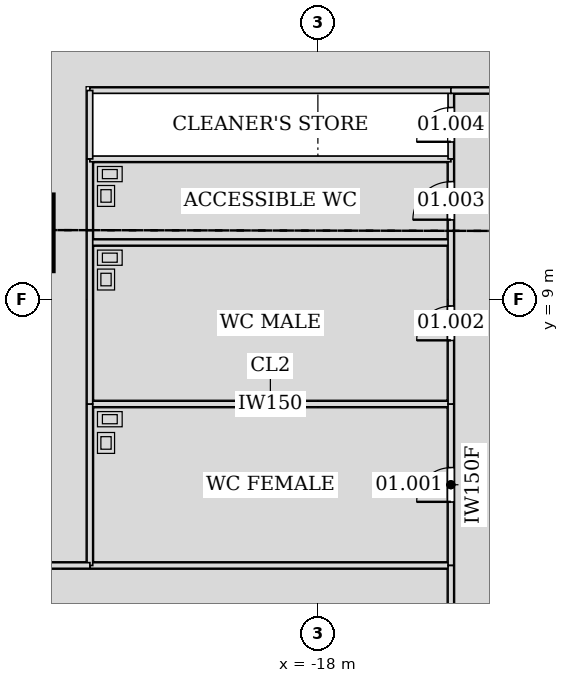
"""IFC4 building model, lengths in metres.
Left out: names, types, materials, properties, quantities, classifications, styles, units other than length and angle.
Written with IfcOpenShell. Run it as: python <this file> out.ifc"""

import sys

from ifc_helpers import new_model, si_unit, direction, frame, frame_2d, origin, origin_2d, place, context, subcontext, project, spatial, rectangle, hollow_rectangle, extrude, element, fill, save


model = new_model("IFC4")
c1 = context("Model", 3, precision=1e-05, world=origin(), true_north=direction((0.0, 1.0)))
c2 = subcontext(c1, "Body", "Model", "MODEL_VIEW")
j1 = project(units=[si_unit("LENGTHUNIT", "METRE"), si_unit("PLANEANGLEUNIT", "RADIAN")], contexts=[c1])
p1 = place(None, origin())
s1 = spatial("IfcSite", under=j1, at=p1, CompositionType="ELEMENT")
p2 = place(p1, origin())
s2 = spatial("IfcBuilding", under=s1, at=p2, CompositionType="ELEMENT")
p3 = place(p2, frame((0.0, 0.0, 7.2)))
s3 = spatial("IfcBuildingStorey", under=s2, at=p3, CompositionType="ELEMENT", Elevation=7.2)
p4 = place(p3, frame((-26.133, 10.824, 0.0), z_axis=(0.028266381762, -0.011713263234, 0.999531795956), x_axis=(0.38282136346, 0.923822387517, 0.0)))
e1 = element("IfcColumn", 1, at=p4, inside=s3, PredefinedType="COLUMN", context=c2, shape_type="SweptSolid", body=[
    extrude(hollow_rectangle(XDim=2.0, YDim=2.0, WallThickness=0.09, at=origin_2d()), origin(), (0.0, 0.0, 1.0), 6.003),
])
p5 = place(p3, frame((-14.788, 35.876, 0.0), z_axis=(0.0, 0.0, 1.0), x_axis=(-0.707106781187, -0.707106781187, 0.0)))
e2 = element("IfcWall", 2, at=p5, inside=s3, PredefinedType="SOLIDWALL", context=c2, shape_type="SweptSolid", body=[
    extrude(rectangle(XDim=29.823, YDim=0.35, at=frame_2d((14.912, 0.0))), origin(), (0.0, 0.0, 1.0), 5.7),
])
p6 = place(p5, frame((0.822, 0.0, 0.9)))
e3 = element("IfcOpeningElement", 3, at=p6, cuts=e2, PredefinedType="OPENING", context=c2, shape_type="SweptSolid", body=[
    extrude(rectangle(XDim=1.2, YDim=4.2, at=frame_2d((0.6, 2.1))), frame((0.0, 0.185, 0.0), z_axis=(0.0, -1.0, 0.0), x_axis=(1.0, 0.0, 0.0)), (0.0, 0.0, 1.0), 0.37),
])
p7 = place(p5, frame((3.52, 0.0, 0.9)))
e4 = element("IfcOpeningElement", 4, at=p7, cuts=e2, PredefinedType="OPENING", context=c2, shape_type="SweptSolid", body=[
    extrude(rectangle(XDim=1.2, YDim=4.2, at=frame_2d((0.6, 2.1))), frame((0.0, 0.185, 0.0), z_axis=(0.0, -1.0, 0.0), x_axis=(1.0, 0.0, 0.0)), (0.0, 0.0, 1.0), 0.37),
])
p8 = place(p5, frame((6.218, 0.0, 0.9)))
e5 = element("IfcOpeningElement", 5, at=p8, cuts=e2, PredefinedType="OPENING", context=c2, shape_type="SweptSolid", body=[
    extrude(rectangle(XDim=1.2, YDim=4.2, at=frame_2d((0.6, 2.1))), frame((0.0, 0.185, 0.0), z_axis=(0.0, -1.0, 0.0), x_axis=(1.0, 0.0, 0.0)), (0.0, 0.0, 1.0), 0.37),
])
p9 = place(p5, frame((8.916, 0.0, 0.9)))
e6 = element("IfcOpeningElement", 6, at=p9, cuts=e2, PredefinedType="OPENING", context=c2, shape_type="SweptSolid", body=[
    extrude(rectangle(XDim=1.2, YDim=4.2, at=frame_2d((0.6, 2.1))), frame((0.0, 0.185, 0.0), z_axis=(0.0, -1.0, 0.0), x_axis=(1.0, 0.0, 0.0)), (0.0, 0.0, 1.0), 0.37),
])
p10 = place(p5, frame((11.614, 0.0, 0.9)))
e7 = element("IfcOpeningElement", 7, at=p10, cuts=e2, PredefinedType="OPENING", context=c2, shape_type="SweptSolid", body=[
    extrude(rectangle(XDim=1.2, YDim=4.2, at=frame_2d((0.6, 2.1))), frame((0.0, 0.185, 0.0), z_axis=(0.0, -1.0, 0.0), x_axis=(1.0, 0.0, 0.0)), (0.0, 0.0, 1.0), 0.37),
])
p11 = place(p5, frame((14.312, 0.0, 0.9)))
e8 = element("IfcOpeningElement", 8, at=p11, cuts=e2, PredefinedType="OPENING", context=c2, shape_type="SweptSolid", body=[
    extrude(rectangle(XDim=1.2, YDim=4.2, at=frame_2d((0.6, 2.1))), frame((0.0, 0.185, 0.0), z_axis=(0.0, -1.0, 0.0), x_axis=(1.0, 0.0, 0.0)), (0.0, 0.0, 1.0), 0.37),
])
p12 = place(p5, frame((17.01, 0.0, 0.9)))
e9 = element("IfcOpeningElement", 9, at=p12, cuts=e2, PredefinedType="OPENING", context=c2, shape_type="SweptSolid", body=[
    extrude(rectangle(XDim=1.2, YDim=4.2, at=frame_2d((0.6, 2.1))), frame((0.0, 0.185, 0.0), z_axis=(0.0, -1.0, 0.0), x_axis=(1.0, 0.0, 0.0)), (0.0, 0.0, 1.0), 0.37),
])
p13 = place(p5, frame((19.708, 0.0, 0.9)))
e10 = element("IfcOpeningElement", 10, at=p13, cuts=e2, PredefinedType="OPENING", context=c2, shape_type="SweptSolid", body=[
    extrude(rectangle(XDim=1.2, YDim=4.2, at=frame_2d((0.6, 2.1))), frame((0.0, 0.185, 0.0), z_axis=(0.0, -1.0, 0.0), x_axis=(1.0, 0.0, 0.0)), (0.0, 0.0, 1.0), 0.37),
])
p14 = place(p5, frame((22.406, 0.0, 0.9)))
e11 = element("IfcOpeningElement", 11, at=p14, cuts=e2, PredefinedType="OPENING", context=c2, shape_type="SweptSolid", body=[
    extrude(rectangle(XDim=1.2, YDim=4.2, at=frame_2d((0.6, 2.1))), frame((0.0, 0.185, 0.0), z_axis=(0.0, -1.0, 0.0), x_axis=(1.0, 0.0, 0.0)), (0.0, 0.0, 1.0), 0.37),
])
p15 = place(p5, frame((25.104, 0.0, 0.9)))
e12 = element("IfcOpeningElement", 12, at=p15, cuts=e2, PredefinedType="OPENING", context=c2, shape_type="SweptSolid", body=[
    extrude(rectangle(XDim=1.2, YDim=4.2, at=frame_2d((0.6, 2.1))), frame((0.0, 0.185, 0.0), z_axis=(0.0, -1.0, 0.0), x_axis=(1.0, 0.0, 0.0)), (0.0, 0.0, 1.0), 0.37),
])
p16 = place(p5, frame((27.802, 0.0, 0.9)))
e13 = element("IfcOpeningElement", 13, at=p16, cuts=e2, PredefinedType="OPENING", context=c2, shape_type="SweptSolid", body=[
    extrude(rectangle(XDim=1.2, YDim=4.2, at=frame_2d((0.6, 2.1))), frame((0.0, 0.185, 0.0), z_axis=(0.0, -1.0, 0.0), x_axis=(1.0, 0.0, 0.0)), (0.0, 0.0, 1.0), 0.37),
])
for number, where, z_axis, x_axis in (
    (14, (-14.5, 6.25, 0.0), (0.0, 0.0, 1.0), (-1.0, 0.0, 0.0)),
    (15, (-24.0, 2.0, 0.0), (0.0, 0.0, 1.0), (1.0, 0.0, 0.0)),
):
    element("IfcWall", number, at=place(p3, frame(where, z_axis=z_axis, x_axis=x_axis)), inside=s3, PredefinedType="PARTITIONING", context=c2, shape_type="SweptSolid", body=[
        extrude(rectangle(XDim=9.5, YDim=0.15, at=frame_2d((4.75, 0.0))), origin(), (0.0, 0.0, 1.0), 4.844),
    ])
p17 = place(p3, frame((-14.5, 2.0, 0.0), z_axis=(0.0, 0.0, 1.0), x_axis=(0.0, 1.0, 0.0)))
e16 = element("IfcWall", 16, at=p17, inside=s3, PredefinedType="PARTITIONING", context=c2, shape_type="SweptSolid", body=[
    extrude(rectangle(XDim=4.25, YDim=0.15, at=frame_2d((2.125, 0.0))), origin(), (0.0, 0.0, 1.0), 5.7),
])
p18 = place(p17, frame((1.675, 0.0, 0.0)))
e17 = element("IfcOpeningElement", 17, at=p18, cuts=e16, PredefinedType="OPENING", context=c2, shape_type="SweptSolid", body=[
    extrude(rectangle(XDim=0.9, YDim=2.1, at=frame_2d((0.45, 1.05))), frame((0.0, 0.085, 0.0), z_axis=(0.0, -1.0, 0.0), x_axis=(1.0, 0.0, 0.0)), (0.0, 0.0, 1.0), 0.17),
])
p19 = place(p3, frame((-24.0, 6.25, 0.0), z_axis=(0.0, 0.0, 1.0), x_axis=(0.0, -1.0, 0.0)))
e18 = element("IfcWall", 18, at=p19, inside=s3, PredefinedType="PARTITIONING", context=c2, shape_type="SweptSolid", body=[
    extrude(rectangle(XDim=4.25, YDim=0.15, at=frame_2d((2.125, 0.0))), origin(), (0.0, 0.0, 1.0), 4.832),
])
p20 = place(p3, frame((-14.5, 10.5, 0.0), z_axis=(0.0, 0.0, 1.0), x_axis=(-1.0, 0.0, 0.0)))
e19 = element("IfcWall", 19, at=p20, inside=s3, PredefinedType="PARTITIONING", context=c2, shape_type="SweptSolid", body=[
    extrude(rectangle(XDim=9.5, YDim=0.15, at=frame_2d((4.75, 0.0))), origin(), (0.0, 0.0, 1.0), 4.39),
])
p21 = place(p3, frame((-14.5, 6.25, 0.0), z_axis=(0.0, 0.0, 1.0), x_axis=(0.0, 1.0, 0.0)))
e20 = element("IfcWall", 20, at=p21, inside=s3, PredefinedType="PARTITIONING", context=c2, shape_type="SweptSolid", body=[
    extrude(rectangle(XDim=6.45, YDim=0.15, at=frame_2d((3.225, 0.0))), origin(), (0.0, 0.0, 1.0), 4.39),
])
p22 = place(p21, frame((1.675, 0.0, 0.0)))
e21 = element("IfcOpeningElement", 21, at=p22, cuts=e20, PredefinedType="OPENING", context=c2, shape_type="SweptSolid", body=[
    extrude(rectangle(XDim=0.9, YDim=2.1, at=frame_2d((0.45, 1.05))), frame((0.0, 0.085, 0.0), z_axis=(0.0, -1.0, 0.0), x_axis=(1.0, 0.0, 0.0)), (0.0, 0.0, 1.0), 0.17),
])
p23 = place(p21, frame((4.85, 0.0, 0.0)))
e22 = element("IfcOpeningElement", 22, at=p23, cuts=e20, PredefinedType="OPENING", context=c2, shape_type="SweptSolid", body=[
    extrude(rectangle(XDim=1.0, YDim=2.1, at=frame_2d((0.5, 1.05))), frame((0.0, 0.085, 0.0), z_axis=(0.0, -1.0, 0.0), x_axis=(1.0, 0.0, 0.0)), (0.0, 0.0, 1.0), 0.17),
])
p24 = place(p3, frame((-24.0, 6.25, 0.0), z_axis=(0.0, 0.0, 1.0), x_axis=(0.0, 1.0, 0.0)))
e23 = element("IfcWall", 23, at=p24, inside=s3, PredefinedType="PARTITIONING", context=c2, shape_type="SweptSolid", body=[
    extrude(rectangle(XDim=6.45, YDim=0.15, at=frame_2d((3.225, 0.0))), origin(), (0.0, 0.0, 1.0), 4.39),
])
p25 = place(p3, frame((-14.5, 12.7, 0.0), z_axis=(0.0, 0.0, 1.0), x_axis=(-1.0, 0.0, 0.0)))
e24 = element("IfcWall", 24, at=p25, inside=s3, PredefinedType="PARTITIONING", context=c2, shape_type="SweptSolid", body=[
    extrude(rectangle(XDim=9.5, YDim=0.15, at=frame_2d((4.75, 0.0))), origin(), (0.0, 0.0, 1.0), 5.088),
])
p26 = place(p3, frame((-14.5, 12.7, 0.0), z_axis=(0.0, 0.0, 1.0), x_axis=(0.0, 1.0, 0.0)))
e25 = element("IfcWall", 25, at=p26, inside=s3, PredefinedType="PARTITIONING", context=c2, shape_type="SweptSolid", body=[
    extrude(rectangle(XDim=1.8, YDim=0.15, at=frame_2d((0.9, 0.0))), origin(), (0.0, 0.0, 1.0), 4.59),
])
p27 = place(p26, frame((0.45, 0.0, 0.0)))
e26 = element("IfcOpeningElement", 26, at=p27, cuts=e25, PredefinedType="OPENING", context=c2, shape_type="SweptSolid", body=[
    extrude(rectangle(XDim=0.9, YDim=2.1, at=frame_2d((0.45, 1.05))), frame((0.0, 0.085, 0.0), z_axis=(0.0, -1.0, 0.0), x_axis=(1.0, 0.0, 0.0)), (0.0, 0.0, 1.0), 0.17),
])
p28 = place(p3, frame((-14.5, 14.5, 0.0), z_axis=(0.0, 0.0, 1.0), x_axis=(-1.0, 0.0, 0.0)))
e27 = element("IfcWall", 27, at=p28, inside=s3, PredefinedType="PARTITIONING", context=c2, shape_type="SweptSolid", body=[
    extrude(rectangle(XDim=9.5, YDim=0.15, at=frame_2d((4.75, 0.0))), origin(), (0.0, 0.0, 1.0), 4.59),
])
p29 = place(p3, frame((-24.0, 14.5, 0.0), z_axis=(0.0, 0.0, 1.0), x_axis=(0.0, -1.0, 0.0)))
e28 = element("IfcWall", 28, at=p29, inside=s3, PredefinedType="PARTITIONING", context=c2, shape_type="SweptSolid", body=[
    extrude(rectangle(XDim=1.8, YDim=0.15, at=frame_2d((0.9, 0.0))), origin(), (0.0, 0.0, 1.0), 4.707),
])
p30 = place(p3, frame((-14.5, -14.5, 0.0), z_axis=(0.0, 0.0, 1.0), x_axis=(0.0, 1.0, 0.0)))
e29 = element("IfcWall", 29, at=p30, inside=s3, PredefinedType="PARTITIONING", context=c2, shape_type="SweptSolid", body=[
    extrude(rectangle(XDim=16.5, YDim=0.15, at=frame_2d((8.25, 0.0))), origin(), (0.0, 0.0, 1.0), 4.39),
])
p31 = place(p3, frame((-23.999, 2.0, 0.0), z_axis=(0.0, 0.0, 1.0), x_axis=(-1.0, 0.0, 0.0)))
e30 = element("IfcWall", 30, at=p31, inside=s3, PredefinedType="PARTITIONING", context=c2, shape_type="SweptSolid", body=[
    extrude(rectangle(XDim=11.651, YDim=0.15, at=frame_2d((5.825, 0.0))), origin(), (0.0, 0.0, 1.0), 4.679),
])
p32 = place(p3, frame((14.5, 14.5, 0.0), z_axis=(0.0, 0.0, 1.0), x_axis=(-1.0, 0.0, 0.0)))
e31 = element("IfcWall", 31, at=p32, inside=s3, PredefinedType="PARTITIONING", context=c2, shape_type="SweptSolid", body=[
    extrude(rectangle(XDim=29.0, YDim=0.15, at=frame_2d((14.5, 0.0))), origin(), (0.0, 0.0, 1.0), 4.39),
])
p33 = place(p32, frame((6.35, 0.0, 0.0)))
e32 = element("IfcOpeningElement", 32, at=p33, cuts=e31, PredefinedType="OPENING", context=c2, shape_type="SweptSolid", body=[
    extrude(rectangle(XDim=1.8, YDim=2.4, at=frame_2d((0.9, 1.2))), frame((0.0, 0.085, 0.0), z_axis=(0.0, -1.0, 0.0), x_axis=(1.0, 0.0, 0.0)), (0.0, 0.0, 1.0), 0.17),
])
p34 = place(p32, frame((13.6, 0.0, 0.0)))
e33 = element("IfcOpeningElement", 33, at=p34, cuts=e31, PredefinedType="OPENING", context=c2, shape_type="SweptSolid", body=[
    extrude(rectangle(XDim=1.8, YDim=2.4, at=frame_2d((0.9, 1.2))), frame((0.0, 0.085, 0.0), z_axis=(0.0, -1.0, 0.0), x_axis=(1.0, 0.0, 0.0)), (0.0, 0.0, 1.0), 0.17),
])
p35 = place(p32, frame((20.85, 0.0, 0.0)))
e34 = element("IfcOpeningElement", 34, at=p35, cuts=e31, PredefinedType="OPENING", context=c2, shape_type="SweptSolid", body=[
    extrude(rectangle(XDim=1.8, YDim=2.4, at=frame_2d((0.9, 1.2))), frame((0.0, 0.085, 0.0), z_axis=(0.0, -1.0, 0.0), x_axis=(1.0, 0.0, 0.0)), (0.0, 0.0, 1.0), 0.17),
])
p36 = place(p18, origin())
e35 = element("IfcDoor", 35, at=p36, inside=s3, OperationType="SINGLE_SWING_LEFT", PredefinedType="DOOR", context=c2, shape_type="SweptSolid", body=[
    extrude(rectangle(XDim=0.9, YDim=2.1, at=frame_2d((0.45, 1.05))), frame((0.0, 0.025, 0.0), z_axis=(0.0, -1.0, 0.0), x_axis=(1.0, 0.0, 0.0)), (0.0, 0.0, 1.0), 0.05),
])
fill(e17, e35)
p37 = place(p22, origin())
e36 = element("IfcDoor", 36, at=p37, inside=s3, OperationType="SINGLE_SWING_LEFT", PredefinedType="DOOR", context=c2, shape_type="SweptSolid", body=[
    extrude(rectangle(XDim=0.9, YDim=2.1, at=frame_2d((0.45, 1.05))), frame((0.0, 0.025, 0.0), z_axis=(0.0, -1.0, 0.0), x_axis=(1.0, 0.0, 0.0)), (0.0, 0.0, 1.0), 0.05),
])
fill(e21, e36)
p38 = place(p23, origin())
e37 = element("IfcDoor", 37, at=p38, inside=s3, OperationType="SINGLE_SWING_LEFT", PredefinedType="DOOR", context=c2, shape_type="SweptSolid", body=[
    extrude(rectangle(XDim=1.0, YDim=2.1, at=frame_2d((0.5, 1.05))), frame((0.0, 0.025, 0.0), z_axis=(0.0, -1.0, 0.0), x_axis=(1.0, 0.0, 0.0)), (0.0, 0.0, 1.0), 0.05),
])
fill(e22, e37)
p39 = place(p27, origin())
e38 = element("IfcDoor", 38, at=p39, inside=s3, OperationType="SINGLE_SWING_LEFT", PredefinedType="DOOR", context=c2, shape_type="SweptSolid", body=[
    extrude(rectangle(XDim=0.9, YDim=2.1, at=frame_2d((0.45, 1.05))), frame((0.0, 0.025, 0.0), z_axis=(0.0, -1.0, 0.0), x_axis=(1.0, 0.0, 0.0)), (0.0, 0.0, 1.0), 0.05),
])
fill(e26, e38)
save(model, sys.argv[1])
